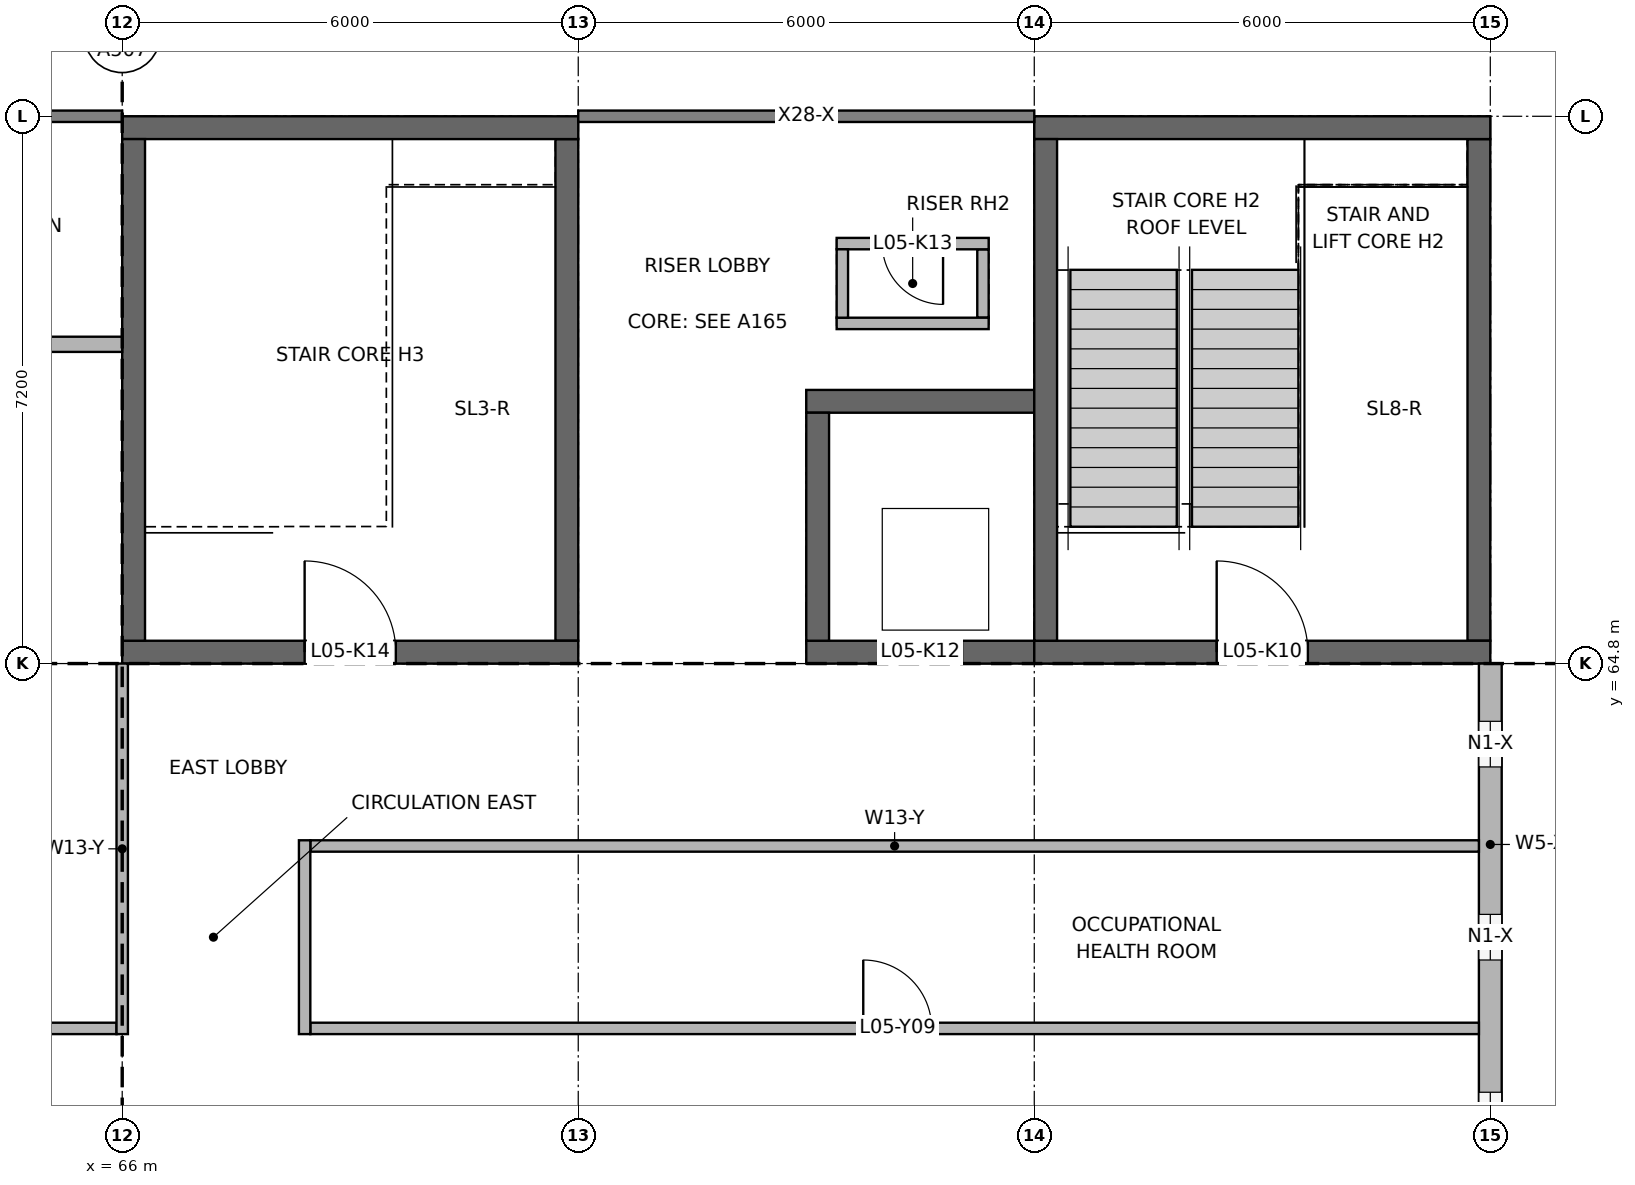
"""IFC4 building model, lengths in metres.
Left out: names, types, materials, properties, quantities, classifications, styles, units other than length and angle.
Written with IfcOpenShell. Run it as: python <this file> out.ifc"""

import sys

from ifc_helpers import new_model, si_unit, direction, frame, frame_2d, origin, place, context, subcontext, project, spatial, rectangle, extrude, element, fill, save


model = new_model("IFC4")
c1 = context("Model", 3, precision=1e-05, world=origin(), true_north=direction((0.0, 1.0)))
c2 = subcontext(c1, "Body", "Model", "MODEL_VIEW")
j1 = project(units=[si_unit("LENGTHUNIT", "METRE"), si_unit("PLANEANGLEUNIT", "RADIAN")], contexts=[c1])
p1 = place(None, origin())
s1 = spatial("IfcSite", under=j1, at=p1, CompositionType="ELEMENT")
p2 = place(p1, origin())
s2 = spatial("IfcBuilding", under=s1, at=p2, CompositionType="ELEMENT")
p3 = place(p2, frame((0.0, 0.0, 21.0)))
s3 = spatial("IfcBuildingStorey", under=s2, at=p3, CompositionType="ELEMENT", Elevation=21.0)
p4 = place(p3, frame((78.0, 64.95, 0.0), z_axis=(0.0, 0.0, 1.0), x_axis=(1.0, 0.0, 0.0)))
e1 = element("IfcWall", 1, at=p4, inside=s3, PredefinedType="SHEAR", context=c2, shape_type="SweptSolid", body=[
    extrude(rectangle(XDim=6.0, YDim=0.3, at=frame_2d((3.0, 0.0))), origin(), (0.0, 0.0, 1.0), 3.95),
])
p5 = place(p4, frame((2.4, 0.0, 0.0)))
e2 = element("IfcOpeningElement", 2, at=p5, cuts=e1, PredefinedType="OPENING", context=c2, shape_type="SweptSolid", body=[
    extrude(rectangle(XDim=1.2, YDim=2.1, at=frame_2d((0.6, 1.05))), frame((0.0, 0.16, 0.0), z_axis=(0.0, -1.0, 0.0), x_axis=(1.0, 0.0, 0.0)), (0.0, 0.0, 1.0), 0.32),
])
p6 = place(p3, frame((78.0, 71.85, 0.0), z_axis=(0.0, 0.0, 1.0), x_axis=(1.0, 0.0, 0.0)))
e3 = element("IfcWall", 3, at=p6, inside=s3, PredefinedType="SHEAR", context=c2, shape_type="SweptSolid", body=[
    extrude(rectangle(XDim=6.0, YDim=0.3, at=frame_2d((3.0, 0.0))), origin(), (0.0, 0.0, 1.0), 3.95),
])
for number, where, z_axis, x_axis in (
    (4, (78.15, 65.1, 0.0), (0.0, 0.0, 1.0), (0.0, 1.0, 0.0)),
    (5, (83.85, 65.1, 0.0), (0.0, 0.0, 1.0), (0.0, 1.0, 0.0)),
):
    element("IfcWall", number, at=place(p3, frame(where, z_axis=z_axis, x_axis=x_axis)), inside=s3, PredefinedType="SHEAR", context=c2, shape_type="SweptSolid", body=[
        extrude(rectangle(XDim=6.6, YDim=0.3, at=frame_2d((3.3, 0.0))), origin(), (0.0, 0.0, 1.0), 3.95),
    ])
p7 = place(p3, frame((75.0, 64.95, 0.0), z_axis=(0.0, 0.0, 1.0), x_axis=(1.0, 0.0, 0.0)))
e6 = element("IfcWall", 6, at=p7, inside=s3, PredefinedType="SHEAR", context=c2, shape_type="SweptSolid", body=[
    extrude(rectangle(XDim=3.0, YDim=0.3, at=frame_2d((1.5, 0.0))), origin(), (0.0, 0.0, 1.0), 5.75),
])
p8 = place(p7, frame((0.95, 0.0, 0.0)))
e7 = element("IfcOpeningElement", 7, at=p8, cuts=e6, PredefinedType="OPENING", context=c2, shape_type="SweptSolid", body=[
    extrude(rectangle(XDim=1.1, YDim=2.1, at=frame_2d((0.55, 1.05))), frame((0.0, 0.16, 0.0), z_axis=(0.0, -1.0, 0.0), x_axis=(1.0, 0.0, 0.0)), (0.0, 0.0, 1.0), 0.32),
])
for number, where, z_axis, x_axis in (
    (8, (75.0, 68.25, 0.0), (0.0, 0.0, 1.0), (1.0, 0.0, 0.0)),
    (9, (75.15, 65.1, 0.0), (0.0, 0.0, 1.0), (0.0, 1.0, 0.0)),
):
    element("IfcWall", number, at=place(p3, frame(where, z_axis=z_axis, x_axis=x_axis)), inside=s3, PredefinedType="SHEAR", context=c2, shape_type="SweptSolid", body=[
        extrude(rectangle(XDim=3.0, YDim=0.3, at=frame_2d((1.5, 0.0))), origin(), (0.0, 0.0, 1.0), 5.75),
    ])
p9 = place(p3, frame((78.0, 64.95, 4.2), z_axis=(0.0, 0.0, 1.0), x_axis=(1.0, 0.0, 0.0)))
e10 = element("IfcWall", 10, at=p9, inside=s3, PredefinedType="SHEAR", context=c2, shape_type="SweptSolid", body=[
    extrude(rectangle(XDim=6.0, YDim=0.3, at=frame_2d((3.0, 0.0))), origin(), (0.0, 0.0, 1.0), 2.4),
])
p10 = place(p9, frame((2.4, 0.0, 0.0)))
e11 = element("IfcOpeningElement", 11, at=p10, cuts=e10, PredefinedType="OPENING", context=c2, shape_type="SweptSolid", body=[
    extrude(rectangle(XDim=1.2, YDim=2.1, at=frame_2d((0.6, 1.05))), frame((0.0, 0.16, 0.0), z_axis=(0.0, -1.0, 0.0), x_axis=(1.0, 0.0, 0.0)), (0.0, 0.0, 1.0), 0.32),
])
p11 = place(p3, frame((78.0, 71.85, 4.2), z_axis=(0.0, 0.0, 1.0), x_axis=(1.0, 0.0, 0.0)))
e12 = element("IfcWall", 12, at=p11, inside=s3, PredefinedType="SHEAR", context=c2, shape_type="SweptSolid", body=[
    extrude(rectangle(XDim=6.0, YDim=0.3, at=frame_2d((3.0, 0.0))), origin(), (0.0, 0.0, 1.0), 2.4),
])
for number, where, z_axis, x_axis in (
    (13, (78.15, 65.1, 4.2), (0.0, 0.0, 1.0), (0.0, 1.0, 0.0)),
    (14, (83.85, 65.1, 4.2), (0.0, 0.0, 1.0), (0.0, 1.0, 0.0)),
):
    element("IfcWall", number, at=place(p3, frame(where, z_axis=z_axis, x_axis=x_axis)), inside=s3, PredefinedType="SHEAR", context=c2, shape_type="SweptSolid", body=[
        extrude(rectangle(XDim=6.6, YDim=0.3, at=frame_2d((3.3, 0.0))), origin(), (0.0, 0.0, 1.0), 2.4),
    ])
p12 = place(p3, frame((66.0, 64.95, 0.0), z_axis=(0.0, 0.0, 1.0), x_axis=(1.0, 0.0, 0.0)))
e15 = element("IfcWall", 15, at=p12, inside=s3, PredefinedType="SHEAR", context=c2, shape_type="SweptSolid", body=[
    extrude(rectangle(XDim=6.0, YDim=0.3, at=frame_2d((3.0, 0.0))), origin(), (0.0, 0.0, 1.0), 3.95),
])
p13 = place(p12, frame((2.4, 0.0, 0.0)))
e16 = element("IfcOpeningElement", 16, at=p13, cuts=e15, PredefinedType="OPENING", context=c2, shape_type="SweptSolid", body=[
    extrude(rectangle(XDim=1.2, YDim=2.1, at=frame_2d((0.6, 1.05))), frame((0.0, 0.16, 0.0), z_axis=(0.0, -1.0, 0.0), x_axis=(1.0, 0.0, 0.0)), (0.0, 0.0, 1.0), 0.32),
])
p14 = place(p3, frame((66.0, 71.85, 0.0), z_axis=(0.0, 0.0, 1.0), x_axis=(1.0, 0.0, 0.0)))
e17 = element("IfcWall", 17, at=p14, inside=s3, PredefinedType="SHEAR", context=c2, shape_type="SweptSolid", body=[
    extrude(rectangle(XDim=6.0, YDim=0.3, at=frame_2d((3.0, 0.0))), origin(), (0.0, 0.0, 1.0), 3.95),
])
for number, where, z_axis, x_axis in (
    (18, (66.15, 65.1, 0.0), (0.0, 0.0, 1.0), (0.0, 1.0, 0.0)),
    (19, (71.85, 65.1, 0.0), (0.0, 0.0, 1.0), (0.0, 1.0, 0.0)),
):
    element("IfcWall", number, at=place(p3, frame(where, z_axis=z_axis, x_axis=x_axis)), inside=s3, PredefinedType="SHEAR", context=c2, shape_type="SweptSolid", body=[
        extrude(rectangle(XDim=6.6, YDim=0.3, at=frame_2d((3.3, 0.0))), origin(), (0.0, 0.0, 1.0), 3.95),
    ])
p15 = place(p3, frame((75.4, 69.275, 0.0), z_axis=(0.0, 0.0, 1.0), x_axis=(1.0, 0.0, 0.0)))
e20 = element("IfcWall", 20, at=p15, inside=s3, PredefinedType="SOLIDWALL", context=c2, shape_type="SweptSolid", body=[
    extrude(rectangle(XDim=2.0, YDim=0.15, at=frame_2d((1.0, 0.0))), origin(), (0.0, 0.0, 1.0), 3.95),
])
p16 = place(p3, frame((75.4, 70.325, 0.0), z_axis=(0.0, 0.0, 1.0), x_axis=(1.0, 0.0, 0.0)))
e21 = element("IfcWall", 21, at=p16, inside=s3, PredefinedType="SOLIDWALL", context=c2, shape_type="SweptSolid", body=[
    extrude(rectangle(XDim=2.0, YDim=0.15, at=frame_2d((1.0, 0.0))), origin(), (0.0, 0.0, 1.0), 3.95),
])
p17 = place(p16, frame((0.6, 0.0, 0.0)))
e22 = element("IfcOpeningElement", 22, at=p17, cuts=e21, PredefinedType="OPENING", context=c2, shape_type="SweptSolid", body=[
    extrude(rectangle(XDim=0.8, YDim=2.1, at=frame_2d((0.4, 1.05))), frame((0.0, 0.085, 0.0), z_axis=(0.0, -1.0, 0.0), x_axis=(1.0, 0.0, 0.0)), (0.0, 0.0, 1.0), 0.17),
])
for number, where, z_axis, x_axis in (
    (23, (75.475, 69.35, 0.0), (0.0, 0.0, 1.0), (0.0, 1.0, 0.0)),
    (24, (77.325, 69.35, 0.0), (0.0, 0.0, 1.0), (0.0, 1.0, 0.0)),
):
    element("IfcWall", number, at=place(p3, frame(where, z_axis=z_axis, x_axis=x_axis)), inside=s3, PredefinedType="SOLIDWALL", context=c2, shape_type="SweptSolid", body=[
        extrude(rectangle(XDim=0.9, YDim=0.15, at=frame_2d((0.45, 0.0))), origin(), (0.0, 0.0, 1.0), 3.95),
    ])
p18 = place(p3, frame((84.0, 58.0, 0.0), z_axis=(0.0, 0.0, 1.0), x_axis=(0.0, 1.0, 0.0)))
e25 = element("IfcWall", 25, at=p18, inside=s3, PredefinedType="SOLIDWALL", context=c2, shape_type="SweptSolid", body=[
    extrude(rectangle(XDim=6.8, YDim=0.3, at=frame_2d((3.4, 0.0))), origin(), (0.0, 0.0, 1.0), 3.05),
])
p19 = place(p18, frame((0.56, 0.0, 0.9)))
e26 = element("IfcOpeningElement", 26, at=p19, cuts=e25, PredefinedType="OPENING", context=c2, shape_type="SweptSolid", body=[
    extrude(rectangle(XDim=0.6, YDim=1.9, at=frame_2d((0.3, 0.95))), frame((0.0, 0.16, 0.0), z_axis=(0.0, -1.0, 0.0), x_axis=(1.0, 0.0, 0.0)), (0.0, 0.0, 1.0), 0.32),
])
p20 = place(p18, frame((2.9, 0.0, 0.9)))
e27 = element("IfcOpeningElement", 27, at=p20, cuts=e25, PredefinedType="OPENING", context=c2, shape_type="SweptSolid", body=[
    extrude(rectangle(XDim=0.6, YDim=1.9, at=frame_2d((0.3, 0.95))), frame((0.0, 0.16, 0.0), z_axis=(0.0, -1.0, 0.0), x_axis=(1.0, 0.0, 0.0)), (0.0, 0.0, 1.0), 0.32),
])
p21 = place(p18, frame((5.44, 0.0, 0.9)))
e28 = element("IfcOpeningElement", 28, at=p21, cuts=e25, PredefinedType="OPENING", context=c2, shape_type="SweptSolid", body=[
    extrude(rectangle(XDim=0.6, YDim=1.9, at=frame_2d((0.3, 0.95))), frame((0.0, 0.16, 0.0), z_axis=(0.0, -1.0, 0.0), x_axis=(1.0, 0.0, 0.0)), (0.0, 0.0, 1.0), 0.32),
])
p22 = place(p3, frame((66.0, 59.925, 0.0), z_axis=(0.0, 0.0, 1.0), x_axis=(0.0, 1.0, 0.0)))
e29 = element("IfcWall", 29, at=p22, inside=s3, PredefinedType="PARTITIONING", context=c2, shape_type="SweptSolid", body=[
    extrude(rectangle(XDim=4.875, YDim=0.15, at=frame_2d((2.438, 0.0))), origin(), (0.0, 0.0, 1.0), 3.95),
])
p23 = place(p3, frame((68.4, 59.925, 0.0), z_axis=(0.0, 0.0, 1.0), x_axis=(0.0, 1.0, 0.0)))
e30 = element("IfcWall", 30, at=p23, inside=s3, PredefinedType="PARTITIONING", context=c2, shape_type="SweptSolid", body=[
    extrude(rectangle(XDim=2.55, YDim=0.15, at=frame_2d((1.275, 0.0))), origin(), (0.0, 0.0, 1.0), 3.95),
])
p24 = place(p3, frame((36.15, 60.0, 0.0), z_axis=(0.0, 0.0, 1.0), x_axis=(1.0, 0.0, 0.0)))
e31 = element("IfcWall", 31, at=p24, inside=s3, PredefinedType="PARTITIONING", context=c2, shape_type="SweptSolid", body=[
    extrude(rectangle(XDim=29.775, YDim=0.15, at=frame_2d((14.888, 0.0))), origin(), (0.0, 0.0, 1.0), 3.15),
])
p25 = place(p24, frame((5.25, 0.0, 0.0)))
e32 = element("IfcOpeningElement", 32, at=p25, cuts=e31, PredefinedType="OPENING", context=c2, shape_type="SweptSolid", body=[
    extrude(rectangle(XDim=1.2, YDim=2.1, at=frame_2d((0.6, 1.05))), frame((0.0, 0.085, 0.0), z_axis=(0.0, -1.0, 0.0), x_axis=(1.0, 0.0, 0.0)), (0.0, 0.0, 1.0), 0.17),
])
p26 = place(p24, frame((15.75, 0.0, 0.0)))
e33 = element("IfcOpeningElement", 33, at=p26, cuts=e31, PredefinedType="OPENING", context=c2, shape_type="SweptSolid", body=[
    extrude(rectangle(XDim=1.2, YDim=2.1, at=frame_2d((0.6, 1.05))), frame((0.0, 0.085, 0.0), z_axis=(0.0, -1.0, 0.0), x_axis=(1.0, 0.0, 0.0)), (0.0, 0.0, 1.0), 0.17),
])
p27 = place(p24, frame((24.75, 0.0, 0.0)))
e34 = element("IfcOpeningElement", 34, at=p27, cuts=e31, PredefinedType="OPENING", context=c2, shape_type="SweptSolid", body=[
    extrude(rectangle(XDim=1.2, YDim=2.1, at=frame_2d((0.6, 1.05))), frame((0.0, 0.085, 0.0), z_axis=(0.0, -1.0, 0.0), x_axis=(1.0, 0.0, 0.0)), (0.0, 0.0, 1.0), 0.17),
])
p28 = place(p3, frame((68.475, 60.0, 0.0), z_axis=(0.0, 0.0, 1.0), x_axis=(1.0, 0.0, 0.0)))
e35 = element("IfcWall", 35, at=p28, inside=s3, PredefinedType="PARTITIONING", context=c2, shape_type="SweptSolid", body=[
    extrude(rectangle(XDim=15.375, YDim=0.15, at=frame_2d((7.688, 0.0))), origin(), (0.0, 0.0, 1.0), 3.95),
])
p29 = place(p28, frame((7.275, 0.0, 0.0)))
e36 = element("IfcOpeningElement", 36, at=p29, cuts=e35, PredefinedType="OPENING", context=c2, shape_type="SweptSolid", body=[
    extrude(rectangle(XDim=0.9, YDim=2.1, at=frame_2d((0.45, 1.05))), frame((0.0, 0.085, 0.0), z_axis=(0.0, -1.0, 0.0), x_axis=(1.0, 0.0, 0.0)), (0.0, 0.0, 1.0), 0.17),
])
p30 = place(p3, frame((68.475, 62.4, 0.0), z_axis=(0.0, 0.0, 1.0), x_axis=(1.0, 0.0, 0.0)))
e37 = element("IfcWall", 37, at=p30, inside=s3, PredefinedType="PARTITIONING", context=c2, shape_type="SweptSolid", body=[
    extrude(rectangle(XDim=15.375, YDim=0.15, at=frame_2d((7.688, 0.0))), origin(), (0.0, 0.0, 1.0), 3.95),
])
p31 = place(p3, frame((57.1, 69.0, 0.0), z_axis=(0.0, 0.0, 1.0), x_axis=(1.0, 0.0, 0.0)))
e38 = element("IfcWall", 38, at=p31, inside=s3, PredefinedType="PARTITIONING", context=c2, shape_type="SweptSolid", body=[
    extrude(rectangle(XDim=8.9, YDim=0.2, at=frame_2d((4.45, 0.0))), origin(), (0.0, 0.0, 1.0), 3.15),
])
p32 = place(p31, frame((3.65, 0.0, 0.0)))
e39 = element("IfcOpeningElement", 39, at=p32, cuts=e38, PredefinedType="OPENING", context=c2, shape_type="SweptSolid", body=[
    extrude(rectangle(XDim=1.5, YDim=2.1, at=frame_2d((0.75, 1.05))), frame((0.0, 0.11, 0.0), z_axis=(0.0, -1.0, 0.0), x_axis=(1.0, 0.0, 0.0)), (0.0, 0.0, 1.0), 0.22),
])
p33 = place(p19, origin())
e40 = element("IfcWindow", 40, at=p33, inside=s3, PartitioningType="SINGLE_PANEL", PredefinedType="WINDOW", context=c2, shape_type="SweptSolid", body=[
    extrude(rectangle(XDim=0.6, YDim=1.9, at=frame_2d((0.3, 0.95))), frame((0.0, 0.03, 0.0), z_axis=(0.0, -1.0, 0.0), x_axis=(1.0, 0.0, 0.0)), (0.0, 0.0, 1.0), 0.06),
])
fill(e26, e40)
p34 = place(p20, origin())
e41 = element("IfcWindow", 41, at=p34, inside=s3, PartitioningType="SINGLE_PANEL", PredefinedType="WINDOW", context=c2, shape_type="SweptSolid", body=[
    extrude(rectangle(XDim=0.6, YDim=1.9, at=frame_2d((0.3, 0.95))), frame((0.0, 0.03, 0.0), z_axis=(0.0, -1.0, 0.0), x_axis=(1.0, 0.0, 0.0)), (0.0, 0.0, 1.0), 0.06),
])
fill(e27, e41)
p35 = place(p21, origin())
e42 = element("IfcWindow", 42, at=p35, inside=s3, PartitioningType="SINGLE_PANEL", PredefinedType="WINDOW", context=c2, shape_type="SweptSolid", body=[
    extrude(rectangle(XDim=0.6, YDim=1.9, at=frame_2d((0.3, 0.95))), frame((0.0, 0.03, 0.0), z_axis=(0.0, -1.0, 0.0), x_axis=(1.0, 0.0, 0.0)), (0.0, 0.0, 1.0), 0.06),
])
fill(e28, e42)
p36 = place(p5, origin())
e43 = element("IfcDoor", 43, at=p36, inside=s3, OperationType="SINGLE_SWING_LEFT", PredefinedType="DOOR", context=c2, shape_type="SweptSolid", body=[
    extrude(rectangle(XDim=1.2, YDim=2.1, at=frame_2d((0.6, 1.05))), frame((0.0, 0.025, 0.0), z_axis=(0.0, -1.0, 0.0), x_axis=(1.0, 0.0, 0.0)), (0.0, 0.0, 1.0), 0.05),
])
fill(e2, e43)
p37 = place(p10, frame((1.2, 0.0, 0.0), z_axis=(0.0, 0.0, 1.0), x_axis=(-1.0, 0.0, 0.0)))
e44 = element("IfcDoor", 44, at=p37, inside=s3, OperationType="SINGLE_SWING_LEFT", PredefinedType="DOOR", context=c2, shape_type="SweptSolid", body=[
    extrude(rectangle(XDim=1.2, YDim=2.1, at=frame_2d((0.6, 1.05))), frame((0.0, 0.025, 0.0), z_axis=(0.0, -1.0, 0.0), x_axis=(1.0, 0.0, 0.0)), (0.0, 0.0, 1.0), 0.05),
])
fill(e11, e44)
p38 = place(p8, origin())
e45 = element("IfcDoor", 45, at=p38, inside=s3, OperationType="DOUBLE_DOOR_SLIDING", PredefinedType="DOOR", context=c2, shape_type="SweptSolid", body=[
    extrude(rectangle(XDim=1.1, YDim=2.1, at=frame_2d((0.55, 1.05))), frame((0.0, 0.025, 0.0), z_axis=(0.0, -1.0, 0.0), x_axis=(1.0, 0.0, 0.0)), (0.0, 0.0, 1.0), 0.05),
])
fill(e7, e45)
p39 = place(p17, frame((0.8, 0.0, 0.0), z_axis=(0.0, 0.0, 1.0), x_axis=(-1.0, 0.0, 0.0)))
e46 = element("IfcDoor", 46, at=p39, inside=s3, OperationType="SINGLE_SWING_LEFT", PredefinedType="DOOR", context=c2, shape_type="SweptSolid", body=[
    extrude(rectangle(XDim=0.8, YDim=2.1, at=frame_2d((0.4, 1.05))), frame((0.0, 0.025, 0.0), z_axis=(0.0, -1.0, 0.0), x_axis=(1.0, 0.0, 0.0)), (0.0, 0.0, 1.0), 0.05),
])
fill(e22, e46)
p40 = place(p13, origin())
e47 = element("IfcDoor", 47, at=p40, inside=s3, OperationType="SINGLE_SWING_LEFT", PredefinedType="DOOR", context=c2, shape_type="SweptSolid", body=[
    extrude(rectangle(XDim=1.2, YDim=2.1, at=frame_2d((0.6, 1.05))), frame((0.0, 0.025, 0.0), z_axis=(0.0, -1.0, 0.0), x_axis=(1.0, 0.0, 0.0)), (0.0, 0.0, 1.0), 0.05),
])
fill(e16, e47)
p41 = place(p29, origin())
e48 = element("IfcDoor", 48, at=p41, inside=s3, OperationType="SINGLE_SWING_LEFT", PredefinedType="DOOR", context=c2, shape_type="SweptSolid", body=[
    extrude(rectangle(XDim=0.9, YDim=2.1, at=frame_2d((0.45, 1.05))), frame((0.0, 0.025, 0.0), z_axis=(0.0, -1.0, 0.0), x_axis=(1.0, 0.0, 0.0)), (0.0, 0.0, 1.0), 0.05),
])
fill(e36, e48)
save(model, sys.argv[1])
